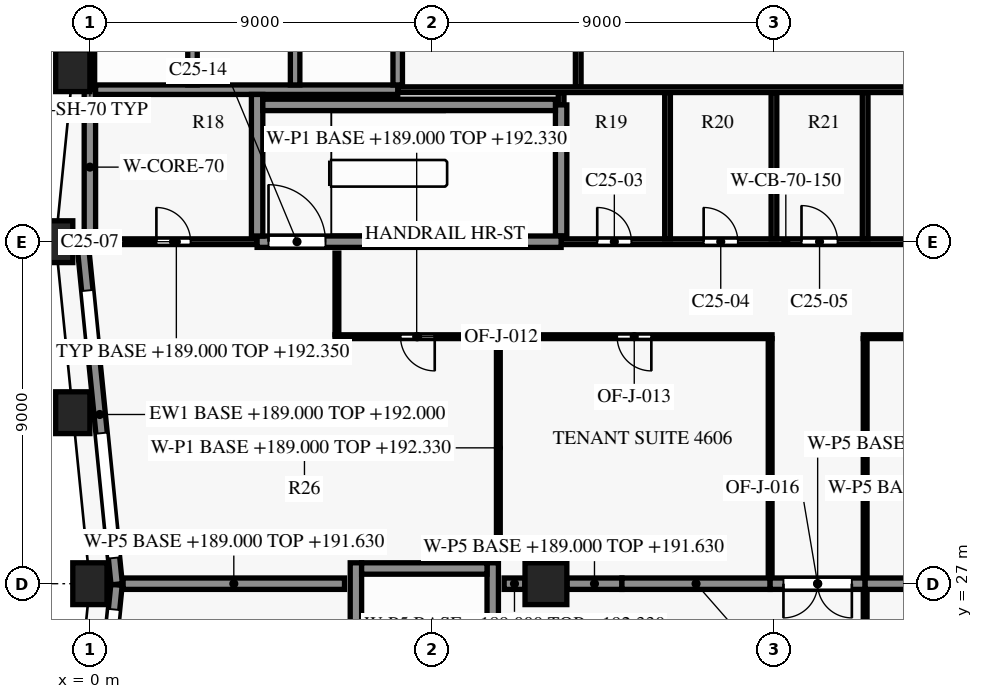
"""IFC4 building model, lengths in metres.
Left out: names, types, materials, properties, quantities, classifications, styles, units other than length and angle.
Written with IfcOpenShell. Run it as: python <this file> out.ifc"""

import sys

from ifc_helpers import new_model, si_unit, direction, frame, frame_2d, origin, origin_2d, place, context, subcontext, project, spatial, rectangle, extrude, element, fill, save


model = new_model("IFC4")
c1 = context("Model", 3, precision=1e-05, world=origin(), true_north=direction((0.0, 1.0)))
c2 = subcontext(c1, "Body", "Model", "MODEL_VIEW")
j1 = project(units=[si_unit("LENGTHUNIT", "METRE"), si_unit("PLANEANGLEUNIT", "RADIAN")], contexts=[c1])
p1 = place(None, origin())
s1 = spatial("IfcSite", under=j1, at=p1, CompositionType="ELEMENT")
p2 = place(p1, origin())
s2 = spatial("IfcBuilding", under=s1, at=p2, CompositionType="ELEMENT")
p3 = place(p2, frame((0.0, 0.0, 189.0)))
s3 = spatial("IfcBuildingStorey", under=s2, at=p3, CompositionType="ELEMENT", Elevation=189.0)
for number, where, z_axis, x_axis in (
    (1, (-0.45, 40.5, 0.0), (0.0, 0.0, 1.0), (-0.1, -0.995, 0.0)),
    (2, (-0.9, 36.0, 0.0), (0.0, 0.0, 1.0), (0.0, -1.0, 0.0)),
    (3, (-0.45, 31.5, 0.0), (0.0, 0.0, 1.0), (0.1, -0.995, 0.0)),
    (4, (0.0, 27.0, 0.0), (0.0, 0.0, 1.0), (0.0, -1.0, 0.0)),
):
    element("IfcColumn", number, at=place(p3, frame(where, z_axis=z_axis, x_axis=x_axis)), inside=s3, PredefinedType="COLUMN", context=c2, shape_type="SweptSolid", body=[
        extrude(rectangle(XDim=0.9, YDim=1.1, at=origin_2d()), origin(), (0.0, 0.0, 1.0), 3.8),
    ])
p4 = place(p3, frame((12.0, 27.0, 0.0), z_axis=(0.0, 0.0, 1.0), x_axis=(1.0, 0.0, 0.0)))
e5 = element("IfcColumn", 5, at=p4, inside=s3, PredefinedType="COLUMN", context=c2, shape_type="SweptSolid", body=[
    extrude(rectangle(XDim=1.1, YDim=1.1, at=origin_2d()), origin(), (0.0, 0.0, 1.0), 3.8),
])
p5 = place(p3, frame((0.705, 26.985, 0.0), z_axis=(0.0, 0.0, 1.0), x_axis=(-0.099533329093, 0.995034228758, 0.0)))
e6 = element("IfcWall", 6, at=p5, inside=s3, PredefinedType="SOLIDWALL", context=c2, shape_type="SweptSolid", body=[
    extrude(rectangle(XDim=8.98, YDim=0.3, at=frame_2d((4.49, 0.0))), origin(), (0.0, 0.0, 1.0), 3.0),
])
p6 = place(p5, frame((0.696, 0.0, 0.15)))
e7 = element("IfcOpeningElement", 7, at=p6, cuts=e6, PredefinedType="OPENING", context=c2, shape_type="SweptSolid", body=[
    extrude(rectangle(XDim=3.3, YDim=2.4, at=frame_2d((1.65, 1.2))), frame((0.0, 0.16, 0.0), z_axis=(0.0, -1.0, 0.0), x_axis=(1.0, 0.0, 0.0)), (0.0, 0.0, 1.0), 0.32),
])
p7 = place(p5, frame((5.969, 0.0, 0.75)))
e8 = element("IfcOpeningElement", 8, at=p7, cuts=e6, PredefinedType="OPENING", context=c2, shape_type="SweptSolid", body=[
    extrude(rectangle(XDim=1.8, YDim=1.8, at=frame_2d((0.9, 0.9))), frame((0.0, 0.16, 0.0), z_axis=(0.0, -1.0, 0.0), x_axis=(1.0, 0.0, 0.0)), (0.0, 0.0, 1.0), 0.32),
])
p8 = place(p3, frame((-0.198, 17.985, 0.0), z_axis=(0.0, 0.0, 1.0), x_axis=(0.099495688264, 0.995037993253, 0.0)))
e9 = element("IfcWall", 9, at=p8, inside=s3, PredefinedType="SOLIDWALL", context=c2, shape_type="SweptSolid", body=[
    extrude(rectangle(XDim=9.03, YDim=0.3, at=frame_2d((4.515, 0.0))), origin(), (0.0, 0.0, 1.0), 3.0),
])
p9 = place(p8, frame((1.306, 0.0, 0.75)))
e10 = element("IfcOpeningElement", 10, at=p9, cuts=e9, PredefinedType="OPENING", context=c2, shape_type="SweptSolid", body=[
    extrude(rectangle(XDim=1.8, YDim=1.8, at=frame_2d((0.9, 0.9))), frame((0.0, 0.16, 0.0), z_axis=(0.0, -1.0, 0.0), x_axis=(1.0, 0.0, 0.0)), (0.0, 0.0, 1.0), 0.32),
])
p10 = place(p8, frame((5.079, 0.0, 0.15)))
e11 = element("IfcOpeningElement", 11, at=p10, cuts=e9, PredefinedType="OPENING", context=c2, shape_type="SweptSolid", body=[
    extrude(rectangle(XDim=3.3, YDim=2.4, at=frame_2d((1.65, 1.2))), frame((0.0, 0.16, 0.0), z_axis=(0.0, -1.0, 0.0), x_axis=(1.0, 0.0, 0.0)), (0.0, 0.0, 1.0), 0.32),
])
p11 = place(p3, frame((7.15, 27.4, 0.0), z_axis=(0.0, 0.0, 1.0), x_axis=(1.0, 0.0, 0.0)))
e12 = element("IfcWall", 12, at=p11, inside=s3, PredefinedType="SHEAR", context=c2, shape_type="SweptSolid", body=[
    extrude(rectangle(XDim=3.3, YDim=0.3, at=frame_2d((1.65, 0.0))), origin(), (0.0, 0.0, 1.0), 3.5),
])
p12 = place(p3, frame((0.15, 36.0, 0.0), z_axis=(0.0, 0.0, 1.0), x_axis=(1.0, 0.0, 0.0)))
e13 = element("IfcWall", 13, at=p12, inside=s3, PredefinedType="PARTITIONING", context=c2, shape_type="SweptSolid", body=[
    extrude(rectangle(XDim=4.25, YDim=0.15, at=frame_2d((2.125, 0.0))), origin(), (0.0, 0.0, 1.0), 3.35),
])
p13 = place(p12, frame((1.6, 0.0, 0.0)))
e14 = element("IfcOpeningElement", 14, at=p13, cuts=e13, PredefinedType="OPENING", context=c2, shape_type="SweptSolid", body=[
    extrude(rectangle(XDim=0.9, YDim=2.1, at=frame_2d((0.45, 1.05))), frame((0.0, 0.085, 0.0), z_axis=(0.0, -1.0, 0.0), x_axis=(1.0, 0.0, 0.0)), (0.0, 0.0, 1.0), 0.17),
])
p14 = place(p3, frame((12.4, 36.0, 0.0), z_axis=(0.0, 0.0, 1.0), x_axis=(1.0, 0.0, 0.0)))
e15 = element("IfcWall", 15, at=p14, inside=s3, PredefinedType="SHEAR", context=c2, shape_type="SweptSolid", body=[
    extrude(rectangle(XDim=11.825, YDim=0.15, at=frame_2d((5.913, 0.0))), origin(), (0.0, 0.0, 1.0), 3.5),
])
p15 = place(p14, frame((0.95, 0.0, 0.0)))
e16 = element("IfcOpeningElement", 16, at=p15, cuts=e15, PredefinedType="OPENING", context=c2, shape_type="SweptSolid", body=[
    extrude(rectangle(XDim=0.9, YDim=2.1, at=frame_2d((0.45, 1.05))), frame((0.0, 0.085, 0.0), z_axis=(0.0, -1.0, 0.0), x_axis=(1.0, 0.0, 0.0)), (0.0, 0.0, 1.0), 0.17),
])
p16 = place(p14, frame((3.75, 0.0, 0.0)))
e17 = element("IfcOpeningElement", 17, at=p16, cuts=e15, PredefinedType="OPENING", context=c2, shape_type="SweptSolid", body=[
    extrude(rectangle(XDim=0.9, YDim=2.1, at=frame_2d((0.45, 1.05))), frame((0.0, 0.085, 0.0), z_axis=(0.0, -1.0, 0.0), x_axis=(1.0, 0.0, 0.0)), (0.0, 0.0, 1.0), 0.17),
])
p17 = place(p14, frame((6.325, 0.0, 0.0)))
e18 = element("IfcOpeningElement", 18, at=p17, cuts=e15, PredefinedType="OPENING", context=c2, shape_type="SweptSolid", body=[
    extrude(rectangle(XDim=0.95, YDim=2.1, at=frame_2d((0.475, 1.05))), frame((0.0, 0.085, 0.0), z_axis=(0.0, -1.0, 0.0), x_axis=(1.0, 0.0, 0.0)), (0.0, 0.0, 1.0), 0.17),
])
p18 = place(p14, frame((9.5, 0.0, 0.0)))
e19 = element("IfcOpeningElement", 19, at=p18, cuts=e15, PredefinedType="OPENING", context=c2, shape_type="SweptSolid", body=[
    extrude(rectangle(XDim=0.9, YDim=2.1, at=frame_2d((0.45, 1.05))), frame((0.0, 0.085, 0.0), z_axis=(0.0, -1.0, 0.0), x_axis=(1.0, 0.0, 0.0)), (0.0, 0.0, 1.0), 0.17),
])
p19 = place(p3, frame((4.4, 36.0, 0.0), z_axis=(0.0, 0.0, 1.0), x_axis=(1.0, 0.0, 0.0)))
e20 = element("IfcWall", 20, at=p19, inside=s3, PredefinedType="SHEAR", context=c2, shape_type="SweptSolid", body=[
    extrude(rectangle(XDim=8.0, YDim=0.3, at=frame_2d((4.0, 0.0))), origin(), (0.0, 0.0, 1.0), 3.5),
])
p20 = place(p19, frame((0.3, 0.0, 0.0)))
e21 = element("IfcOpeningElement", 21, at=p20, cuts=e20, PredefinedType="OPENING", context=c2, shape_type="SweptSolid", body=[
    extrude(rectangle(XDim=1.5, YDim=2.2, at=frame_2d((0.75, 1.1))), frame((0.0, 0.16, 0.0), z_axis=(0.0, -1.0, 0.0), x_axis=(1.0, 0.0, 0.0)), (0.0, 0.0, 1.0), 0.32),
])
p21 = place(p3, frame((4.55, 39.6, 0.0), z_axis=(0.0, 0.0, 1.0), x_axis=(1.0, 0.0, 0.0)))
e22 = element("IfcWall", 22, at=p21, inside=s3, PredefinedType="SHEAR", context=c2, shape_type="SweptSolid", body=[
    extrude(rectangle(XDim=7.7, YDim=0.3, at=frame_2d((3.85, 0.0))), origin(), (0.0, 0.0, 1.0), 3.5),
])
p22 = place(p3, frame((8.1, 40.0, 0.0), z_axis=(0.0, 0.0, 1.0), x_axis=(1.0, 0.0, 0.0)))
e23 = element("IfcWall", 23, at=p22, inside=s3, PredefinedType="PARTITIONING", context=c2, shape_type="SweptSolid", body=[
    extrude(rectangle(XDim=16.125, YDim=0.15, at=frame_2d((8.062, 0.0))), origin(), (0.0, 0.0, 1.0), 3.35),
])
p23 = place(p3, frame((0.15, 40.0, 0.0), z_axis=(0.0, 0.0, 1.0), x_axis=(1.0, 0.0, 0.0)))
e24 = element("IfcWall", 24, at=p23, inside=s3, PredefinedType="SHEAR", context=c2, shape_type="SweptSolid", body=[
    extrude(rectangle(XDim=7.95, YDim=0.25, at=frame_2d((3.975, 0.0))), origin(), (0.0, 0.0, 1.0), 3.5),
])
p24 = place(p3, frame((0.0, 35.925, 0.0), z_axis=(0.0, 0.0, 1.0), x_axis=(0.0, 1.0, 0.0)))
e25 = element("IfcWall", 25, at=p24, inside=s3, PredefinedType="SHEAR", context=c2, shape_type="SweptSolid", body=[
    extrude(rectangle(XDim=4.075, YDim=0.3, at=frame_2d((2.038, 0.0))), origin(), (0.0, 0.0, 1.0), 3.5),
])
p25 = place(p3, frame((0.0, 40.0, 0.0), z_axis=(0.0, 0.0, 1.0), x_axis=(0.0, 1.0, 0.0)))
e26 = element("IfcWall", 26, at=p25, inside=s3, PredefinedType="SHEAR", context=c2, shape_type="SweptSolid", body=[
    extrude(rectangle(XDim=3.325, YDim=0.25, at=frame_2d((1.663, 0.0))), origin(), (0.0, 0.0, 1.0), 3.5),
])
p26 = place(p3, frame((2.7, 40.125, 0.0), z_axis=(0.0, 0.0, 1.0), x_axis=(0.0, 1.0, 0.0)))
e27 = element("IfcWall", 27, at=p26, inside=s3, PredefinedType="SHEAR", context=c2, shape_type="SweptSolid", body=[
    extrude(rectangle(XDim=2.95, YDim=0.25, at=frame_2d((1.475, 0.0))), origin(), (0.0, 0.0, 1.0), 3.5),
])
p27 = place(p3, frame((4.4, 36.15, 0.0), z_axis=(0.0, 0.0, 1.0), x_axis=(0.0, 1.0, 0.0)))
e28 = element("IfcWall", 28, at=p27, inside=s3, PredefinedType="SHEAR", context=c2, shape_type="SweptSolid", body=[
    extrude(rectangle(XDim=3.725, YDim=0.3, at=frame_2d((1.863, 0.0))), origin(), (0.0, 0.0, 1.0), 3.5),
])
p28 = place(p3, frame((5.4, 40.125, 0.0), z_axis=(0.0, 0.0, 1.0), x_axis=(0.0, 1.0, 0.0)))
e29 = element("IfcWall", 29, at=p28, inside=s3, PredefinedType="SHEAR", context=c2, shape_type="SweptSolid", body=[
    extrude(rectangle(XDim=2.95, YDim=0.25, at=frame_2d((1.475, 0.0))), origin(), (0.0, 0.0, 1.0), 3.5),
])
p29 = place(p3, frame((7.0, 19.25, 0.0), z_axis=(0.0, 0.0, 1.0), x_axis=(0.0, 1.0, 0.0)))
e30 = element("IfcWall", 30, at=p29, inside=s3, PredefinedType="SHEAR", context=c2, shape_type="SweptSolid", body=[
    extrude(rectangle(XDim=8.3, YDim=0.3, at=frame_2d((4.15, 0.0))), origin(), (0.0, 0.0, 1.0), 3.5),
])
p30 = place(p3, frame((8.1, 40.125, 0.0), z_axis=(0.0, 0.0, 1.0), x_axis=(0.0, 1.0, 0.0)))
e31 = element("IfcWall", 31, at=p30, inside=s3, PredefinedType="SHEAR", context=c2, shape_type="SweptSolid", body=[
    extrude(rectangle(XDim=2.95, YDim=0.25, at=frame_2d((1.475, 0.0))), origin(), (0.0, 0.0, 1.0), 3.5),
])
p31 = place(p3, frame((10.6, 19.25, 0.0), z_axis=(0.0, 0.0, 1.0), x_axis=(0.0, 1.0, 0.0)))
e32 = element("IfcWall", 32, at=p31, inside=s3, PredefinedType="SHEAR", context=c2, shape_type="SweptSolid", body=[
    extrude(rectangle(XDim=8.3, YDim=0.3, at=frame_2d((4.15, 0.0))), origin(), (0.0, 0.0, 1.0), 3.5),
])
p32 = place(p31, frame((0.55, 0.0, 0.0)))
e33 = element("IfcOpeningElement", 33, at=p32, cuts=e32, PredefinedType="OPENING", context=c2, shape_type="SweptSolid", body=[
    extrude(rectangle(XDim=1.2, YDim=2.2, at=frame_2d((0.6, 1.1))), frame((0.0, 0.16, 0.0), z_axis=(0.0, -1.0, 0.0), x_axis=(1.0, 0.0, 0.0)), (0.0, 0.0, 1.0), 0.32),
])
p33 = place(p3, frame((12.4, 39.6, 0.0), z_axis=(0.0, 0.0, 1.0), x_axis=(0.0, 1.0, 0.0)))
e34 = element("IfcWall", 34, at=p33, inside=s3, PredefinedType="PARTITIONING", context=c2, shape_type="SweptSolid", body=[
    extrude(rectangle(XDim=0.325, YDim=0.15, at=frame_2d((0.163, 0.0))), origin(), (0.0, 0.0, 1.0), 3.35),
])
p34 = place(p3, frame((12.4, 36.15, 0.0), z_axis=(0.0, 0.0, 1.0), x_axis=(0.0, 1.0, 0.0)))
e35 = element("IfcWall", 35, at=p34, inside=s3, PredefinedType="SHEAR", context=c2, shape_type="SweptSolid", body=[
    extrude(rectangle(XDim=3.45, YDim=0.3, at=frame_2d((1.725, 0.0))), origin(), (0.0, 0.0, 1.0), 3.5),
])
p35 = place(p3, frame((12.85, 40.075, 0.0), z_axis=(0.0, 0.0, 1.0), x_axis=(0.0, 1.0, 0.0)))
e36 = element("IfcWall", 36, at=p35, inside=s3, PredefinedType="PARTITIONING", context=c2, shape_type="SweptSolid", body=[
    extrude(rectangle(XDim=3.05, YDim=0.15, at=frame_2d((1.525, 0.0))), origin(), (0.0, 0.0, 1.0), 3.35),
])
for number, where, z_axis, x_axis in (
    (37, (15.2, 36.075, 0.0), (0.0, 0.0, 1.0), (0.0, 1.0, 0.0)),
    (38, (18.0, 36.075, 0.0), (0.0, 0.0, 1.0), (0.0, 1.0, 0.0)),
    (39, (20.4, 36.075, 0.0), (0.0, 0.0, 1.0), (0.0, 1.0, 0.0)),
):
    element("IfcWall", number, at=place(p3, frame(where, z_axis=z_axis, x_axis=x_axis)), inside=s3, PredefinedType="PARTITIONING", context=c2, shape_type="SweptSolid", body=[
        extrude(rectangle(XDim=3.85, YDim=0.15, at=frame_2d((1.925, 0.0))), origin(), (0.0, 0.0, 1.0), 3.35),
    ])
p36 = place(p3, frame((20.4, 26.83, 0.0), z_axis=(0.0, 0.0, 1.0), x_axis=(0.0, -1.0, 0.0)))
e40 = element("IfcWall", 40, at=p36, inside=s3, PredefinedType="PARTITIONING", context=c2, shape_type="SweptSolid", body=[
    extrude(rectangle(XDim=14.48, YDim=0.1, at=frame_2d((7.24, 0.0))), origin(), (0.0, 0.0, 1.0), 2.63),
])
p37 = place(p36, frame((6.73, 0.0, 0.0)))
e41 = element("IfcOpeningElement", 41, at=p37, cuts=e40, PredefinedType="OPENING", context=c2, shape_type="SweptSolid", body=[
    extrude(rectangle(XDim=0.9, YDim=2.1, at=frame_2d((0.45, 1.05))), frame((0.0, 0.06, 0.0), z_axis=(0.0, -1.0, 0.0), x_axis=(1.0, 0.0, 0.0)), (0.0, 0.0, 1.0), 0.12),
])
p38 = place(p3, frame((0.874, 27.0, 0.0), z_axis=(0.0, 0.0, 1.0), x_axis=(1.0, 0.0, 0.0)))
e42 = element("IfcWall", 42, at=p38, inside=s3, PredefinedType="PARTITIONING", context=c2, shape_type="SweptSolid", body=[
    extrude(rectangle(XDim=5.826, YDim=0.3, at=frame_2d((2.913, 0.0))), origin(), (0.0, 0.0, 1.0), 2.63),
])
p39 = place(p3, frame((10.9, 27.0, 0.0), z_axis=(0.0, 0.0, 1.0), x_axis=(1.0, 0.0, 0.0)))
e43 = element("IfcWall", 43, at=p39, inside=s3, PredefinedType="PARTITIONING", context=c2, shape_type="SweptSolid", body=[
    extrude(rectangle(XDim=0.545, YDim=0.3, at=frame_2d((0.272, 0.0))), origin(), (0.0, 0.0, 1.0), 3.33),
])
p40 = place(p3, frame((12.555, 27.0, 0.0), z_axis=(0.0, 0.0, 1.0), x_axis=(1.0, 0.0, 0.0)))
e44 = element("IfcWall", 44, at=p40, inside=s3, PredefinedType="PARTITIONING", context=c2, shape_type="SweptSolid", body=[
    extrude(rectangle(XDim=1.445, YDim=0.3, at=frame_2d((0.723, 0.0))), origin(), (0.0, 0.0, 1.0), 2.63),
])
p41 = place(p3, frame((14.0, 27.0, 0.0), z_axis=(0.0, 0.0, 1.0), x_axis=(1.0, 0.0, 0.0)))
e45 = element("IfcWall", 45, at=p41, inside=s3, PredefinedType="PARTITIONING", context=c2, shape_type="SweptSolid", body=[
    extrude(rectangle(XDim=3.9, YDim=0.3, at=frame_2d((1.95, 0.0))), origin(), (0.0, 0.0, 1.0), 2.63),
])
p42 = place(p3, frame((20.4, 27.0, 0.0), z_axis=(0.0, 0.0, 1.0), x_axis=(-1.0, 0.0, 0.0)))
e46 = element("IfcWall", 46, at=p42, inside=s3, PredefinedType="PARTITIONING", context=c2, shape_type="SweptSolid", body=[
    extrude(rectangle(XDim=2.5, YDim=0.3, at=frame_2d((1.25, 0.0))), origin(), (0.0, 0.0, 1.0), 2.63),
])
p43 = place(p42, frame((0.35, 0.0, 0.0)))
e47 = element("IfcOpeningElement", 47, at=p43, cuts=e46, PredefinedType="OPENING", context=c2, shape_type="SweptSolid", body=[
    extrude(rectangle(XDim=1.8, YDim=2.1, at=frame_2d((0.9, 1.05))), frame((0.0, 0.16, 0.0), z_axis=(0.0, -1.0, 0.0), x_axis=(1.0, 0.0, 0.0)), (0.0, 0.0, 1.0), 0.32),
])
p44 = place(p3, frame((20.4, 27.0, 0.0), z_axis=(0.0, 0.0, 1.0), x_axis=(1.0, 0.0, 0.0)))
e48 = element("IfcWall", 48, at=p44, inside=s3, PredefinedType="PARTITIONING", context=c2, shape_type="SweptSolid", body=[
    extrude(rectangle(XDim=3.045, YDim=0.3, at=frame_2d((1.522, 0.0))), origin(), (0.0, 0.0, 1.0), 2.63),
])
p45 = place(p3, frame((17.9, 27.17, 0.0), z_axis=(0.0, 0.0, 1.0), x_axis=(0.0, 1.0, 0.0)))
e49 = element("IfcWall", 49, at=p45, inside=s3, PredefinedType="PARTITIONING", context=c2, shape_type="SweptSolid", body=[
    extrude(rectangle(XDim=6.28, YDim=0.1, at=frame_2d((3.14, 0.0))), origin(), (0.0, 0.0, 1.0), 2.63),
])
p46 = place(p3, frame((10.748, 33.45, 0.0), z_axis=(0.0, 0.0, 1.0), x_axis=(0.0, -1.0, 0.0)))
e50 = element("IfcWall", 50, at=p46, inside=s3, PredefinedType="PARTITIONING", context=c2, shape_type="SweptSolid", body=[
    extrude(rectangle(XDim=5.75, YDim=0.1, at=frame_2d((2.875, 0.0))), origin(), (0.0, 0.0, 1.0), 3.33),
])
p47 = place(p3, frame((20.4, 33.45, 0.0), z_axis=(0.0, 0.0, 1.0), x_axis=(0.0, -1.0, 0.0)))
e51 = element("IfcWall", 51, at=p47, inside=s3, PredefinedType="PARTITIONING", context=c2, shape_type="SweptSolid", body=[
    extrude(rectangle(XDim=6.28, YDim=0.1, at=frame_2d((3.14, 0.0))), origin(), (0.0, 0.0, 1.0), 2.63),
])
p48 = place(p3, frame((10.748, 33.5, 0.0), z_axis=(0.0, 0.0, 1.0), x_axis=(-1.0, 0.0, 0.0)))
e52 = element("IfcWall", 52, at=p48, inside=s3, PredefinedType="PARTITIONING", context=c2, shape_type="SweptSolid", body=[
    extrude(rectangle(XDim=4.298, YDim=0.1, at=frame_2d((2.149, 0.0))), origin(), (0.0, 0.0, 1.0), 3.33),
])
p49 = place(p48, frame((1.674, 0.0, 0.0)))
e53 = element("IfcOpeningElement", 53, at=p49, cuts=e52, PredefinedType="OPENING", context=c2, shape_type="SweptSolid", body=[
    extrude(rectangle(XDim=0.9, YDim=2.1, at=frame_2d((0.45, 1.05))), frame((0.0, 0.06, 0.0), z_axis=(0.0, -1.0, 0.0), x_axis=(1.0, 0.0, 0.0)), (0.0, 0.0, 1.0), 0.12),
])
p50 = place(p3, frame((17.95, 33.5, 0.0), z_axis=(0.0, 0.0, 1.0), x_axis=(-1.0, 0.0, 0.0)))
e54 = element("IfcWall", 54, at=p50, inside=s3, PredefinedType="PARTITIONING", context=c2, shape_type="SweptSolid", body=[
    extrude(rectangle(XDim=7.202, YDim=0.1, at=frame_2d((3.601, 0.0))), origin(), (0.0, 0.0, 1.0), 2.63),
])
p51 = place(p50, frame((3.176, 0.0, 0.0)))
e55 = element("IfcOpeningElement", 55, at=p51, cuts=e54, PredefinedType="OPENING", context=c2, shape_type="SweptSolid", body=[
    extrude(rectangle(XDim=0.9, YDim=2.1, at=frame_2d((0.45, 1.05))), frame((0.0, 0.06, 0.0), z_axis=(0.0, -1.0, 0.0), x_axis=(1.0, 0.0, 0.0)), (0.0, 0.0, 1.0), 0.12),
])
p52 = place(p3, frame((31.05, 33.5, 0.0), z_axis=(0.0, 0.0, 1.0), x_axis=(-1.0, 0.0, 0.0)))
e56 = element("IfcWall", 56, at=p52, inside=s3, PredefinedType="PARTITIONING", context=c2, shape_type="SweptSolid", body=[
    extrude(rectangle(XDim=10.7, YDim=0.1, at=frame_2d((5.35, 0.0))), origin(), (0.0, 0.0, 1.0), 2.63),
])
p53 = place(p3, frame((6.5, 33.55, 0.0), z_axis=(0.0, 0.0, 1.0), x_axis=(0.0, 1.0, 0.0)))
e57 = element("IfcWall", 57, at=p53, inside=s3, PredefinedType="PARTITIONING", context=c2, shape_type="SweptSolid", body=[
    extrude(rectangle(XDim=2.15, YDim=0.1, at=frame_2d((1.075, 0.0))), origin(), (0.0, 0.0, 1.0), 3.33),
])
p54 = place(p6, origin())
e58 = element("IfcWindow", 58, at=p54, inside=s3, PartitioningType="SINGLE_PANEL", PredefinedType="WINDOW", context=c2, shape_type="SweptSolid", body=[
    extrude(rectangle(XDim=3.3, YDim=2.4, at=frame_2d((1.65, 1.2))), frame((0.0, 0.03, 0.0), z_axis=(0.0, -1.0, 0.0), x_axis=(1.0, 0.0, 0.0)), (0.0, 0.0, 1.0), 0.06),
])
fill(e7, e58)
p55 = place(p7, origin())
e59 = element("IfcWindow", 59, at=p55, inside=s3, PartitioningType="SINGLE_PANEL", PredefinedType="WINDOW", context=c2, shape_type="SweptSolid", body=[
    extrude(rectangle(XDim=1.8, YDim=1.8, at=frame_2d((0.9, 0.9))), frame((0.0, 0.03, 0.0), z_axis=(0.0, -1.0, 0.0), x_axis=(1.0, 0.0, 0.0)), (0.0, 0.0, 1.0), 0.06),
])
fill(e8, e59)
p56 = place(p10, origin())
e60 = element("IfcWindow", 60, at=p56, inside=s3, PartitioningType="SINGLE_PANEL", PredefinedType="WINDOW", context=c2, shape_type="SweptSolid", body=[
    extrude(rectangle(XDim=3.3, YDim=2.4, at=frame_2d((1.65, 1.2))), frame((0.0, 0.03, 0.0), z_axis=(0.0, -1.0, 0.0), x_axis=(1.0, 0.0, 0.0)), (0.0, 0.0, 1.0), 0.06),
])
fill(e11, e60)
p57 = place(p15, origin())
e61 = element("IfcDoor", 61, at=p57, inside=s3, OperationType="SINGLE_SWING_RIGHT", PredefinedType="DOOR", context=c2, shape_type="SweptSolid", body=[
    extrude(rectangle(XDim=0.9, YDim=2.1, at=frame_2d((0.45, 1.05))), frame((0.0, 0.025, 0.0), z_axis=(0.0, -1.0, 0.0), x_axis=(1.0, 0.0, 0.0)), (0.0, 0.0, 1.0), 0.05),
])
fill(e16, e61)
p58 = place(p16, origin())
e62 = element("IfcDoor", 62, at=p58, inside=s3, OperationType="SINGLE_SWING_LEFT", PredefinedType="DOOR", context=c2, shape_type="SweptSolid", body=[
    extrude(rectangle(XDim=0.9, YDim=2.1, at=frame_2d((0.45, 1.05))), frame((0.0, 0.025, 0.0), z_axis=(0.0, -1.0, 0.0), x_axis=(1.0, 0.0, 0.0)), (0.0, 0.0, 1.0), 0.05),
])
fill(e17, e62)
p59 = place(p17, origin())
e63 = element("IfcDoor", 63, at=p59, inside=s3, OperationType="SINGLE_SWING_RIGHT", PredefinedType="DOOR", context=c2, shape_type="SweptSolid", body=[
    extrude(rectangle(XDim=0.95, YDim=2.1, at=frame_2d((0.475, 1.05))), frame((0.0, 0.025, 0.0), z_axis=(0.0, -1.0, 0.0), x_axis=(1.0, 0.0, 0.0)), (0.0, 0.0, 1.0), 0.05),
])
fill(e18, e63)
p60 = place(p13, origin())
e64 = element("IfcDoor", 64, at=p60, inside=s3, OperationType="SINGLE_SWING_LEFT", PredefinedType="DOOR", context=c2, shape_type="SweptSolid", body=[
    extrude(rectangle(XDim=0.9, YDim=2.1, at=frame_2d((0.45, 1.05))), frame((0.0, 0.025, 0.0), z_axis=(0.0, -1.0, 0.0), x_axis=(1.0, 0.0, 0.0)), (0.0, 0.0, 1.0), 0.05),
])
fill(e14, e64)
p61 = place(p20, origin())
e65 = element("IfcDoor", 65, at=p61, inside=s3, OperationType="SINGLE_SWING_RIGHT", PredefinedType="DOOR", context=c2, shape_type="SweptSolid", body=[
    extrude(rectangle(XDim=1.5, YDim=2.2, at=frame_2d((0.75, 1.1))), frame((0.0, 0.025, 0.0), z_axis=(0.0, -1.0, 0.0), x_axis=(1.0, 0.0, 0.0)), (0.0, 0.0, 1.0), 0.05),
])
fill(e21, e65)
p62 = place(p49, origin())
e66 = element("IfcDoor", 66, at=p62, inside=s3, OperationType="SINGLE_SWING_RIGHT", PredefinedType="DOOR", context=c2, shape_type="SweptSolid", body=[
    extrude(rectangle(XDim=0.9, YDim=2.1, at=frame_2d((0.45, 1.05))), frame((0.0, 0.025, 0.0), z_axis=(0.0, -1.0, 0.0), x_axis=(1.0, 0.0, 0.0)), (0.0, 0.0, 1.0), 0.05),
])
fill(e53, e66)
p63 = place(p51, origin())
e67 = element("IfcDoor", 67, at=p63, inside=s3, OperationType="SINGLE_SWING_RIGHT", PredefinedType="DOOR", context=c2, shape_type="SweptSolid", body=[
    extrude(rectangle(XDim=0.9, YDim=2.1, at=frame_2d((0.45, 1.05))), frame((0.0, 0.025, 0.0), z_axis=(0.0, -1.0, 0.0), x_axis=(1.0, 0.0, 0.0)), (0.0, 0.0, 1.0), 0.05),
])
fill(e55, e67)
p64 = place(p43, origin())
e68 = element("IfcDoor", 68, at=p64, inside=s3, OperationType="DOUBLE_DOOR_SINGLE_SWING", PredefinedType="DOOR", context=c2, shape_type="SweptSolid", body=[
    extrude(rectangle(XDim=1.8, YDim=2.1, at=frame_2d((0.9, 1.05))), frame((0.0, 0.025, 0.0), z_axis=(0.0, -1.0, 0.0), x_axis=(1.0, 0.0, 0.0)), (0.0, 0.0, 1.0), 0.05),
])
fill(e47, e68)
save(model, sys.argv[1])
